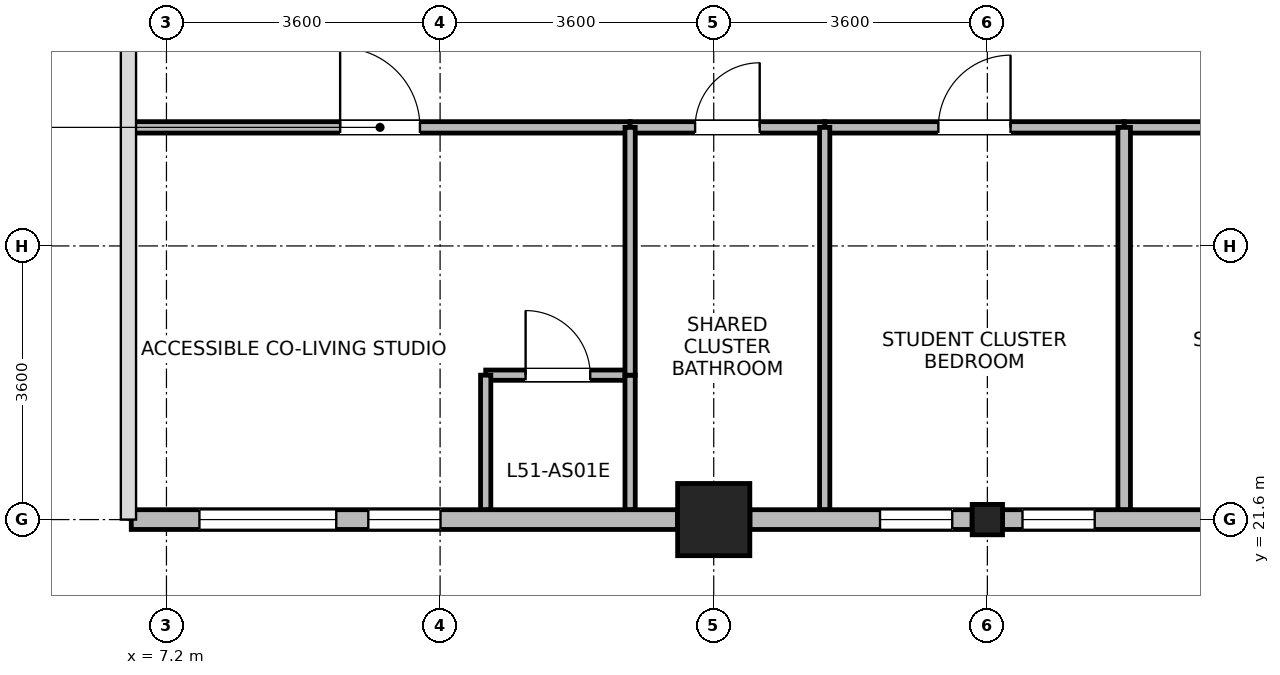
"""IFC4 building model, lengths in metres.
Left out: names, types, materials, properties, quantities, classifications, styles, units other than length and angle.
Written with IfcOpenShell. Run it as: python <this file> out.ifc"""

import sys

from ifc_helpers import new_model, si_unit, direction, frame, frame_2d, origin, origin_2d, place, context, subcontext, project, spatial, rectangle, i_section, extrude, source, transform, mapped, element, fill, save


model = new_model("IFC4")
c1 = context("Model", 3, precision=1e-05, world=origin(), true_north=direction((0.0, 1.0)))
c2 = subcontext(c1, "Body", "Model", "MODEL_VIEW")
j1 = project(units=[si_unit("LENGTHUNIT", "METRE"), si_unit("PLANEANGLEUNIT", "RADIAN")], contexts=[c1])
p1 = place(None, origin())
s1 = spatial("IfcSite", under=j1, at=p1, CompositionType="ELEMENT")
p2 = place(p1, origin())
s2 = spatial("IfcBuilding", under=s1, at=p2, CompositionType="ELEMENT")
p3 = place(p2, frame((0.0, 0.0, 201.8)))
s3 = spatial("IfcBuildingStorey", under=s2, at=p3, CompositionType="ELEMENT", Elevation=201.8)
m1 = source(origin(), c2, "Body", "SweptSolid", [
    extrude(rectangle(XDim=0.95, YDim=0.95, at=origin_2d()), origin(), (0.0, 0.0, 1.0), 3.7),
])
p4 = place(p3, frame((14.4, 21.6, 0.0), z_axis=(0.0, 0.0, 1.0), x_axis=(1.0, 0.0, 0.0)))
e1 = element("IfcColumn", 1, at=p4, inside=s3, PredefinedType="COLUMN", context=c2, shape_type="MappedRepresentation", body=[
    mapped(m1, transform((0.0, 0.0, 0.0), x_axis=(1.0, 0.0, 0.0), y_axis=(0.0, 1.0, 0.0), z_axis=(0.0, 0.0, 1.0), scale=1.0)),
])
m2 = source(origin(), c2, "Body", "SweptSolid", [
    extrude(i_section(OverallWidth=0.399, OverallDepth=0.4, WebThickness=0.017, FlangeThickness=0.023, FilletRadius=0.015, at=origin_2d()), origin(), (0.0, 0.0, 1.0), 3.7),
])
p5 = place(p3, frame((18.0, 21.6, 0.0), z_axis=(0.0, 0.0, 1.0), x_axis=(1.0, 0.0, 0.0)))
e2 = element("IfcColumn", 2, at=p5, inside=s3, PredefinedType="COLUMN", context=c2, shape_type="MappedRepresentation", body=[
    mapped(m2, transform((0.0, 0.0, 0.0), x_axis=(1.0, 0.0, 0.0), y_axis=(0.0, 1.0, 0.0), z_axis=(0.0, 0.0, 1.0), scale=1.0)),
])
p6 = place(p3, frame((13.924, 21.6, 0.0), z_axis=(0.0, 0.0, 1.0), x_axis=(-1.0, 0.0, 0.0)))
e3 = element("IfcWall", 3, at=p6, inside=s3, PredefinedType="STANDARD", context=c2, shape_type="SweptSolid", body=[
    extrude(rectangle(XDim=7.187, YDim=0.26, at=frame_2d((3.594, 0.0))), origin(), (0.0, 0.0, 1.0), 3.45),
])
p7 = place(p6, frame((4.49, 0.0, 0.85)))
e4 = element("IfcOpeningElement", 4, at=p7, cuts=e3, PredefinedType="OPENING", context=c2, shape_type="SweptSolid", body=[
    extrude(rectangle(XDim=1.8, YDim=1.85, at=frame_2d((0.9, 0.925))), frame((0.0, 0.14, 0.0), z_axis=(0.0, -1.0, 0.0), x_axis=(1.0, 0.0, 0.0)), (0.0, 0.0, 1.0), 0.28),
])
p8 = place(p6, frame((3.118, 0.0, 0.85)))
e5 = element("IfcOpeningElement", 5, at=p8, cuts=e3, PredefinedType="OPENING", context=c2, shape_type="SweptSolid", body=[
    extrude(rectangle(XDim=0.95, YDim=1.75, at=frame_2d((0.475, 0.875))), frame((0.0, 0.14, 0.0), z_axis=(0.0, -1.0, 0.0), x_axis=(1.0, 0.0, 0.0)), (0.0, 0.0, 1.0), 0.28),
])
p9 = place(p3, frame((17.8, 21.6, 0.0), z_axis=(0.0, 0.0, 1.0), x_axis=(-1.0, 0.0, 0.0)))
e6 = element("IfcWall", 6, at=p9, inside=s3, PredefinedType="STANDARD", context=c2, shape_type="SweptSolid", body=[
    extrude(rectangle(XDim=2.924, YDim=0.26, at=frame_2d((1.462, 0.0))), origin(), (0.0, 0.0, 1.0), 3.0),
])
p10 = place(p9, frame((0.262, 0.0, 0.85)))
e7 = element("IfcOpeningElement", 7, at=p10, cuts=e6, PredefinedType="OPENING", context=c2, shape_type="SweptSolid", body=[
    extrude(rectangle(XDim=0.95, YDim=1.75, at=frame_2d((0.475, 0.875))), frame((0.0, 0.14, 0.0), z_axis=(0.0, -1.0, 0.0), x_axis=(1.0, 0.0, 0.0)), (0.0, 0.0, 1.0), 0.28),
])
p11 = place(p3, frame((21.124, 21.6, 0.0), z_axis=(0.0, 0.0, 1.0), x_axis=(-1.0, 0.0, 0.0)))
e8 = element("IfcWall", 8, at=p11, inside=s3, PredefinedType="STANDARD", context=c2, shape_type="SweptSolid", body=[
    extrude(rectangle(XDim=2.924, YDim=0.26, at=frame_2d((1.462, 0.0))), origin(), (0.0, 0.0, 1.0), 3.0),
])
p12 = place(p11, frame((1.712, 0.0, 0.85)))
e9 = element("IfcOpeningElement", 9, at=p12, cuts=e8, PredefinedType="OPENING", context=c2, shape_type="SweptSolid", body=[
    extrude(rectangle(XDim=0.95, YDim=1.75, at=frame_2d((0.475, 0.875))), frame((0.0, 0.14, 0.0), z_axis=(0.0, -1.0, 0.0), x_axis=(1.0, 0.0, 0.0)), (0.0, 0.0, 1.0), 0.28),
])
p13 = place(p3, frame((11.4, 23.5, 0.0), z_axis=(0.0, 0.0, 1.0), x_axis=(1.0, 0.0, 0.0)))
e10 = element("IfcWall", 10, at=p13, inside=s3, PredefinedType="PARTITIONING", context=c2, shape_type="SweptSolid", body=[
    extrude(rectangle(XDim=1.9, YDim=0.135, at=frame_2d((0.95, 0.0))), origin(), (0.0, 0.0, 1.0), 3.45),
])
p14 = place(p13, frame((0.525, 0.0, 0.0)))
e11 = element("IfcOpeningElement", 11, at=p14, cuts=e10, PredefinedType="OPENING", context=c2, shape_type="SweptSolid", body=[
    extrude(rectangle(XDim=0.85, YDim=2.04, at=frame_2d((0.425, 1.02))), frame((0.0, 0.078, 0.0), z_axis=(0.0, -1.0, 0.0), x_axis=(1.0, 0.0, 0.0)), (0.0, 0.0, 1.0), 0.155),
])
for number, where, z_axis, x_axis in (
    (12, (11.4, 21.732, 0.0), (0.0, 0.0, 1.0), (0.0, 1.0, 0.0)),
    (13, (13.3, 21.732, 0.0), (0.0, 0.0, 1.0), (0.0, 1.0, 0.0)),
):
    element("IfcWall", number, at=place(p3, frame(where, z_axis=z_axis, x_axis=x_axis)), inside=s3, PredefinedType="PARTITIONING", context=c2, shape_type="SweptSolid", body=[
        extrude(rectangle(XDim=1.768, YDim=0.135, at=frame_2d((0.884, 0.0))), origin(), (0.0, 0.0, 1.0), 3.45),
    ])
p15 = place(p3, frame((6.72, 26.76, 0.0), z_axis=(0.0, 0.0, 1.0), x_axis=(1.0, 0.0, 0.0)))
e14 = element("IfcWall", 14, at=p15, inside=s3, PredefinedType="PARTITIONING", context=c2, shape_type="SweptSolid", body=[
    extrude(rectangle(XDim=6.58, YDim=0.15, at=frame_2d((3.29, 0.0))), origin(), (0.0, 0.0, 1.0), 3.45),
])
p16 = place(p15, frame((2.765, 0.0, 0.0)))
e15 = element("IfcOpeningElement", 15, at=p16, cuts=e14, PredefinedType="OPENING", context=c2, shape_type="SweptSolid", body=[
    extrude(rectangle(XDim=1.05, YDim=2.12, at=frame_2d((0.525, 1.06))), frame((0.0, 0.085, 0.0), z_axis=(0.0, -1.0, 0.0), x_axis=(1.0, 0.0, 0.0)), (0.0, 0.0, 1.0), 0.17),
])
p17 = place(p3, frame((19.8, 26.76, 0.0), z_axis=(0.0, 0.0, 1.0), x_axis=(1.0, 0.0, 0.0)))
e16 = element("IfcWall", 16, at=p17, inside=s3, PredefinedType="PARTITIONING", context=c2, shape_type="SweptSolid", body=[
    extrude(rectangle(XDim=4.24, YDim=0.15, at=frame_2d((2.12, 0.0))), origin(), (0.0, 0.0, 1.0), 3.45),
])
p18 = place(p17, frame((1.645, 0.0, 0.0)))
e17 = element("IfcOpeningElement", 17, at=p18, cuts=e16, PredefinedType="OPENING", context=c2, shape_type="SweptSolid", body=[
    extrude(rectangle(XDim=0.95, YDim=2.1, at=frame_2d((0.475, 1.05))), frame((0.0, 0.085, 0.0), z_axis=(0.0, -1.0, 0.0), x_axis=(1.0, 0.0, 0.0)), (0.0, 0.0, 1.0), 0.17),
])
p19 = place(p3, frame((15.86, 26.76, 0.0), z_axis=(0.0, 0.0, 1.0), x_axis=(1.0, 0.0, 0.0)))
e18 = element("IfcWall", 18, at=p19, inside=s3, PredefinedType="PARTITIONING", context=c2, shape_type="SweptSolid", body=[
    extrude(rectangle(XDim=3.94, YDim=0.15, at=frame_2d((1.97, 0.0))), origin(), (0.0, 0.0, 1.0), 3.45),
])
p20 = place(p19, frame((1.495, 0.0, 0.0)))
e19 = element("IfcOpeningElement", 19, at=p20, cuts=e18, PredefinedType="OPENING", context=c2, shape_type="SweptSolid", body=[
    extrude(rectangle(XDim=0.95, YDim=2.1, at=frame_2d((0.475, 1.05))), frame((0.0, 0.085, 0.0), z_axis=(0.0, -1.0, 0.0), x_axis=(1.0, 0.0, 0.0)), (0.0, 0.0, 1.0), 0.17),
])
p21 = place(p3, frame((13.3, 26.76, 0.0), z_axis=(0.0, 0.0, 1.0), x_axis=(1.0, 0.0, 0.0)))
e20 = element("IfcWall", 20, at=p21, inside=s3, PredefinedType="PARTITIONING", context=c2, shape_type="SweptSolid", body=[
    extrude(rectangle(XDim=2.56, YDim=0.15, at=frame_2d((1.28, 0.0))), origin(), (0.0, 0.0, 1.0), 3.45),
])
p22 = place(p21, frame((0.855, 0.0, 0.0)))
e21 = element("IfcOpeningElement", 21, at=p22, cuts=e20, PredefinedType="OPENING", context=c2, shape_type="SweptSolid", body=[
    extrude(rectangle(XDim=0.85, YDim=2.04, at=frame_2d((0.425, 1.02))), frame((0.0, 0.085, 0.0), z_axis=(0.0, -1.0, 0.0), x_axis=(1.0, 0.0, 0.0)), (0.0, 0.0, 1.0), 0.17),
])
p23 = place(p3, frame((15.86, 21.732, 0.0), z_axis=(0.0, 0.0, 1.0), x_axis=(0.0, 1.0, 0.0)))
e22 = element("IfcWall", 22, at=p23, inside=s3, PredefinedType="PARTITIONING", context=c2, shape_type="SweptSolid", body=[
    extrude(rectangle(XDim=5.028, YDim=0.135, at=frame_2d((2.514, 0.0))), origin(), (0.0, 0.0, 1.0), 3.45),
])
p24 = place(p3, frame((19.8, 21.732, 0.0), z_axis=(0.0, 0.0, 1.0), x_axis=(0.0, 1.0, 0.0)))
e23 = element("IfcWall", 23, at=p24, inside=s3, PredefinedType="PARTITIONING", context=c2, shape_type="SweptSolid", body=[
    extrude(rectangle(XDim=5.028, YDim=0.165, at=frame_2d((2.514, 0.0))), origin(), (0.0, 0.0, 1.0), 3.45),
])
p25 = place(p3, frame((13.3, 23.5, 0.0), z_axis=(0.0, 0.0, 1.0), x_axis=(0.0, 1.0, 0.0)))
e24 = element("IfcWall", 24, at=p25, inside=s3, PredefinedType="PARTITIONING", context=c2, shape_type="SweptSolid", body=[
    extrude(rectangle(XDim=3.26, YDim=0.135, at=frame_2d((1.63, 0.0))), origin(), (0.0, 0.0, 1.0), 3.45),
])
p26 = place(p7, origin())
e25 = element("IfcWindow", 25, at=p26, inside=s3, PartitioningType="SINGLE_PANEL", PredefinedType="WINDOW", context=c2, shape_type="SweptSolid", body=[
    extrude(rectangle(XDim=1.8, YDim=1.85, at=frame_2d((0.9, 0.925))), frame((0.0, 0.03, 0.0), z_axis=(0.0, -1.0, 0.0), x_axis=(1.0, 0.0, 0.0)), (0.0, 0.0, 1.0), 0.06),
])
fill(e4, e25)
p27 = place(p8, origin())
e26 = element("IfcWindow", 26, at=p27, inside=s3, PartitioningType="SINGLE_PANEL", PredefinedType="WINDOW", context=c2, shape_type="SweptSolid", body=[
    extrude(rectangle(XDim=0.95, YDim=1.75, at=frame_2d((0.475, 0.875))), frame((0.0, 0.03, 0.0), z_axis=(0.0, -1.0, 0.0), x_axis=(1.0, 0.0, 0.0)), (0.0, 0.0, 1.0), 0.06),
])
fill(e5, e26)
p28 = place(p10, origin())
e27 = element("IfcWindow", 27, at=p28, inside=s3, PartitioningType="SINGLE_PANEL", PredefinedType="WINDOW", context=c2, shape_type="SweptSolid", body=[
    extrude(rectangle(XDim=0.95, YDim=1.75, at=frame_2d((0.475, 0.875))), frame((0.0, 0.03, 0.0), z_axis=(0.0, -1.0, 0.0), x_axis=(1.0, 0.0, 0.0)), (0.0, 0.0, 1.0), 0.06),
])
fill(e7, e27)
p29 = place(p12, origin())
e28 = element("IfcWindow", 28, at=p29, inside=s3, PartitioningType="SINGLE_PANEL", PredefinedType="WINDOW", context=c2, shape_type="SweptSolid", body=[
    extrude(rectangle(XDim=0.95, YDim=1.75, at=frame_2d((0.475, 0.875))), frame((0.0, 0.03, 0.0), z_axis=(0.0, -1.0, 0.0), x_axis=(1.0, 0.0, 0.0)), (0.0, 0.0, 1.0), 0.06),
])
fill(e9, e28)
p30 = place(p14, origin())
e29 = element("IfcDoor", 29, at=p30, inside=s3, OperationType="SINGLE_SWING_LEFT", PredefinedType="DOOR", context=c2, shape_type="SweptSolid", body=[
    extrude(rectangle(XDim=0.85, YDim=2.04, at=frame_2d((0.425, 1.02))), frame((0.0, 0.025, 0.0), z_axis=(0.0, -1.0, 0.0), x_axis=(1.0, 0.0, 0.0)), (0.0, 0.0, 1.0), 0.05),
])
fill(e11, e29)
p31 = place(p16, origin())
e30 = element("IfcDoor", 30, at=p31, inside=s3, OperationType="SINGLE_SWING_LEFT", PredefinedType="DOOR", context=c2, shape_type="SweptSolid", body=[
    extrude(rectangle(XDim=1.05, YDim=2.12, at=frame_2d((0.525, 1.06))), frame((0.0, 0.025, 0.0), z_axis=(0.0, -1.0, 0.0), x_axis=(1.0, 0.0, 0.0)), (0.0, 0.0, 1.0), 0.05),
])
fill(e15, e30)
p32 = place(p20, origin())
e31 = element("IfcDoor", 31, at=p32, inside=s3, OperationType="SINGLE_SWING_RIGHT", PredefinedType="DOOR", context=c2, shape_type="SweptSolid", body=[
    extrude(rectangle(XDim=0.95, YDim=2.1, at=frame_2d((0.475, 1.05))), frame((0.0, 0.025, 0.0), z_axis=(0.0, -1.0, 0.0), x_axis=(1.0, 0.0, 0.0)), (0.0, 0.0, 1.0), 0.05),
])
fill(e19, e31)
p33 = place(p22, origin())
e32 = element("IfcDoor", 32, at=p33, inside=s3, OperationType="SINGLE_SWING_RIGHT", PredefinedType="DOOR", context=c2, shape_type="SweptSolid", body=[
    extrude(rectangle(XDim=0.85, YDim=2.04, at=frame_2d((0.425, 1.02))), frame((0.0, 0.025, 0.0), z_axis=(0.0, -1.0, 0.0), x_axis=(1.0, 0.0, 0.0)), (0.0, 0.0, 1.0), 0.05),
])
fill(e21, e32)
save(model, sys.argv[1])
